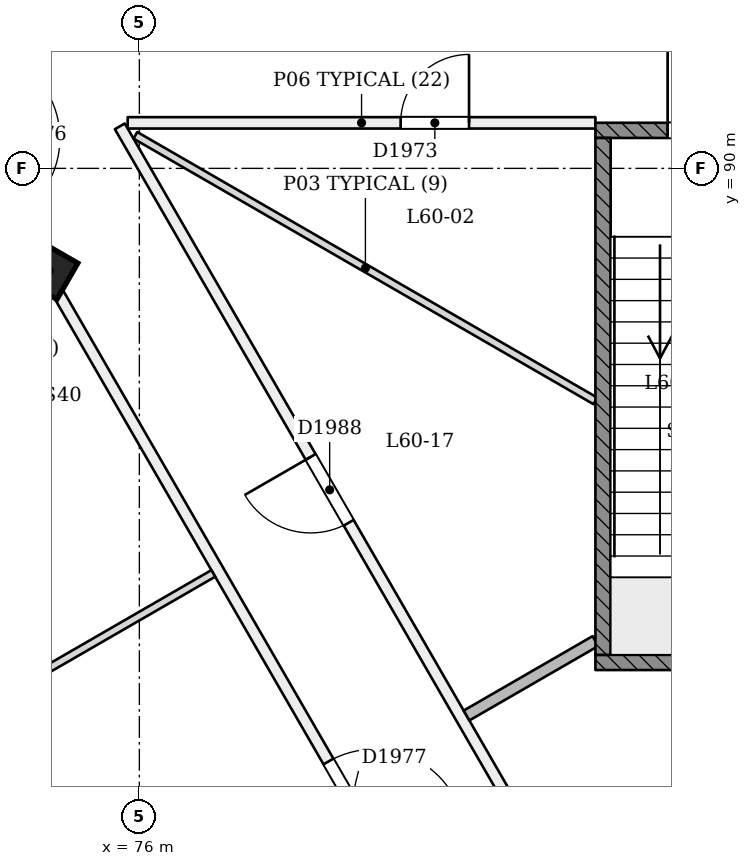
"""IFC4 building model, lengths in metres.
Left out: names, types, materials, properties, quantities, classifications, styles, units other than length and angle.
Written with IfcOpenShell. Run it as: python <this file> out.ifc"""

import sys

from ifc_helpers import new_model, si_unit, direction, frame, frame_2d, origin, origin_2d, place, context, subcontext, project, spatial, rectangle, extrude, element, fill, save


model = new_model("IFC4")
c1 = context("Model", 3, precision=1e-05, world=origin(), true_north=direction((0.0, 1.0)))
c2 = subcontext(c1, "Body", "Model", "MODEL_VIEW")
j1 = project(units=[si_unit("LENGTHUNIT", "METRE"), si_unit("PLANEANGLEUNIT", "RADIAN")], contexts=[c1])
p1 = place(None, origin())
s1 = spatial("IfcSite", under=j1, at=p1, CompositionType="ELEMENT")
p2 = place(p1, origin())
s2 = spatial("IfcBuilding", under=s1, at=p2, CompositionType="ELEMENT")
p3 = place(p2, frame((0.0, 0.0, 233.8)))
s3 = spatial("IfcBuildingStorey", under=s2, at=p3, CompositionType="ELEMENT", Elevation=233.8)
p4 = place(p3, frame((74.787, 88.605, -0.017), z_axis=(0.022221387519, 0.03843577394, 0.999013964476), x_axis=(-0.865894001003, -0.49874768271, 0.038449031443)))
e1 = element("IfcColumn", 1, at=p4, inside=s3, PredefinedType="COLUMN", context=c2, shape_type="SweptSolid", body=[
    extrude(rectangle(XDim=0.55, YDim=0.55, at=origin_2d()), origin(), (0.0, 0.0, 1.0), 5.406),
])
p5 = place(p3, frame((75.846, 90.599, 0.0), z_axis=(0.0, 0.0, 1.0), x_axis=(1.0, 0.0, 0.0)))
e2 = element("IfcWall", 2, at=p5, inside=s3, PredefinedType="PARTITIONING", context=c2, shape_type="SweptSolid", body=[
    extrude(rectangle(XDim=6.154, YDim=0.15, at=frame_2d((3.077, 0.0))), origin(), (0.0, 0.0, 1.0), 5.0),
])
p6 = place(p5, frame((3.591, 0.0, 0.0)))
e3 = element("IfcOpeningElement", 3, at=p6, cuts=e2, PredefinedType="OPENING", context=c2, shape_type="SweptSolid", body=[
    extrude(rectangle(XDim=0.9, YDim=2.1, at=frame_2d((0.45, 1.05))), frame((0.0, 0.085, 0.0), z_axis=(0.0, -1.0, 0.0), x_axis=(1.0, 0.0, 0.0)), (0.0, 0.0, 1.0), 0.171),
])
p7 = place(p3, frame((73.636, 90.6, 0.0), z_axis=(0.0, 0.0, 1.0), x_axis=(0.500000171588, -0.866025304718, 0.0)))
e4 = element("IfcWall", 4, at=p7, inside=s3, PredefinedType="PARTITIONING", context=c2, shape_type="SweptSolid", body=[
    extrude(rectangle(XDim=22.728, YDim=0.15, at=frame_2d((11.364, 0.0))), origin(), (0.0, 0.0, 1.0), 4.6),
])
p8 = place(p7, frame((0.237, 0.0, 0.0)))
e5 = element("IfcOpeningElement", 5, at=p8, cuts=e4, PredefinedType="OPENING", context=c2, shape_type="SweptSolid", body=[
    extrude(rectangle(XDim=1.2, YDim=2.1, at=frame_2d((0.6, 1.05))), frame((0.0, 0.085, 0.0), z_axis=(0.0, -1.0, 0.0), x_axis=(1.0, 0.0, 0.0)), (0.0, 0.0, 1.0), 0.171),
])
p9 = place(p7, frame((9.703, 0.0, 0.0)))
e6 = element("IfcOpeningElement", 6, at=p9, cuts=e4, PredefinedType="OPENING", context=c2, shape_type="SweptSolid", body=[
    extrude(rectangle(XDim=1.2, YDim=2.1, at=frame_2d((0.6, 1.05))), frame((0.0, 0.085, 0.0), z_axis=(0.0, -1.0, 0.0), x_axis=(1.0, 0.0, 0.0)), (0.0, 0.0, 1.0), 0.171),
])
p10 = place(p7, frame((17.453, 0.0, 0.0)))
e7 = element("IfcOpeningElement", 7, at=p10, cuts=e4, PredefinedType="OPENING", context=c2, shape_type="SweptSolid", body=[
    extrude(rectangle(XDim=1.2, YDim=2.1, at=frame_2d((0.6, 1.05))), frame((0.0, 0.085, 0.0), z_axis=(0.0, -1.0, 0.0), x_axis=(1.0, 0.0, 0.0)), (0.0, 0.0, 1.0), 0.171),
])
p11 = place(p7, frame((20.917, 0.0, 0.0)))
e8 = element("IfcOpeningElement", 8, at=p11, cuts=e4, PredefinedType="OPENING", context=c2, shape_type="SweptSolid", body=[
    extrude(rectangle(XDim=1.2, YDim=2.1, at=frame_2d((0.6, 1.05))), frame((0.0, 0.085, 0.0), z_axis=(0.0, -1.0, 0.0), x_axis=(1.0, 0.0, 0.0)), (0.0, 0.0, 1.0), 0.171),
])
p12 = place(p3, frame((84.935, 74.63, 0.0), z_axis=(0.0, 0.0, 1.0), x_axis=(-0.499956559012, 0.866050482998, 0.0)))
e9 = element("IfcWall", 9, at=p12, inside=s3, PredefinedType="PARTITIONING", context=c2, shape_type="SweptSolid", body=[
    extrude(rectangle(XDim=18.386, YDim=0.15, at=frame_2d((9.193, 0.0))), origin(), (0.0, 0.0, 1.0), 5.0),
])
p13 = place(p12, frame((12.364, 0.0, 0.0)))
e10 = element("IfcOpeningElement", 10, at=p13, cuts=e9, PredefinedType="OPENING", context=c2, shape_type="SweptSolid", body=[
    extrude(rectangle(XDim=1.0, YDim=2.1, at=frame_2d((0.5, 1.05))), frame((0.0, 0.085, 0.0), z_axis=(0.0, -1.0, 0.0), x_axis=(1.0, 0.0, 0.0)), (0.0, 0.0, 1.0), 0.171),
])
p14 = place(p12, frame((5.916, 0.0, 0.0)))
e11 = element("IfcOpeningElement", 11, at=p14, cuts=e9, PredefinedType="OPENING", context=c2, shape_type="SweptSolid", body=[
    extrude(rectangle(XDim=1.0, YDim=2.1, at=frame_2d((0.5, 1.05))), frame((0.0, 0.085, 0.0), z_axis=(0.0, -1.0, 0.0), x_axis=(1.0, 0.0, 0.0)), (0.0, 0.0, 1.0), 0.171),
])
p15 = place(p3, frame((75.948, 90.435, 0.0), z_axis=(0.0, 0.0, 1.0), x_axis=(0.866033166555, -0.499986554245, 0.0)))
e12 = element("IfcWall", 12, at=p15, inside=s3, PredefinedType="PARTITIONING", context=c2, shape_type="SweptSolid", body=[
    extrude(rectangle(XDim=6.989, YDim=0.1, at=frame_2d((3.494, 0.0))), origin(), (0.0, 0.0, 1.0), 5.0),
])
p16 = place(p3, frame((71.495, 81.509, 0.0), z_axis=(0.0, 0.0, 1.0), x_axis=(0.866032601554, 0.49998753289, 0.0)))
e13 = element("IfcWall", 13, at=p16, inside=s3, PredefinedType="PARTITIONING", context=c2, shape_type="SweptSolid", body=[
    extrude(rectangle(XDim=6.325, YDim=0.1, at=frame_2d((3.163, 0.0))), origin(), (0.0, 0.0, 1.0), 4.5),
])
p17 = place(p3, frame((80.304, 82.802, 0.0), z_axis=(0.0, 0.0, 1.0), x_axis=(0.866040248701, 0.499974286969, 0.0)))
e14 = element("IfcWall", 14, at=p17, inside=s3, PredefinedType="PARTITIONING", context=c2, shape_type="SweptSolid", body=[
    extrude(rectangle(XDim=1.958, YDim=0.15, at=frame_2d((0.979, 0.0))), origin(), (0.0, 0.0, 1.0), 5.0),
])
p18 = place(p3, frame((82.0, 90.5, 0.0), z_axis=(0.0, 0.0, 1.0), x_axis=(1.0, 0.0, 0.0)))
e15 = element("IfcWall", 15, at=p18, inside=s3, PredefinedType="SOLIDWALL", context=c2, shape_type="SweptSolid", body=[
    extrude(rectangle(XDim=6.0, YDim=0.2, at=frame_2d((3.0, 0.0))), origin(), (0.0, 0.0, 1.0), 5.0),
])
p19 = place(p18, frame((0.95, 0.0, 0.0)))
e16 = element("IfcOpeningElement", 16, at=p19, cuts=e15, PredefinedType="OPENING", context=c2, shape_type="SweptSolid", body=[
    extrude(rectangle(XDim=1.2, YDim=2.1, at=frame_2d((0.6, 1.05))), frame((0.0, 0.11, 0.0), z_axis=(0.0, -1.0, 0.0), x_axis=(1.0, 0.0, 0.0)), (0.0, 0.0, 1.0), 0.221),
])
p20 = place(p18, frame((3.85, 0.0, 0.0)))
e17 = element("IfcOpeningElement", 17, at=p20, cuts=e15, PredefinedType="OPENING", context=c2, shape_type="SweptSolid", body=[
    extrude(rectangle(XDim=1.2, YDim=2.1, at=frame_2d((0.6, 1.05))), frame((0.0, 0.11, 0.0), z_axis=(0.0, -1.0, 0.0), x_axis=(1.0, 0.0, 0.0)), (0.0, 0.0, 1.0), 0.221),
])
p21 = place(p3, frame((82.0, 83.5, 0.0), z_axis=(0.0, 0.0, 1.0), x_axis=(1.0, 0.0, 0.0)))
e18 = element("IfcWall", 18, at=p21, inside=s3, PredefinedType="SOLIDWALL", context=c2, shape_type="SweptSolid", body=[
    extrude(rectangle(XDim=6.0, YDim=0.2, at=frame_2d((3.0, 0.0))), origin(), (0.0, 0.0, 1.0), 5.0),
])
p22 = place(p3, frame((82.1, 83.6, 0.0), z_axis=(0.0, 0.0, 1.0), x_axis=(0.0, 1.0, 0.0)))
e19 = element("IfcWall", 19, at=p22, inside=s3, PredefinedType="SOLIDWALL", context=c2, shape_type="SweptSolid", body=[
    extrude(rectangle(XDim=6.8, YDim=0.2, at=frame_2d((3.4, 0.0))), origin(), (0.0, 0.0, 1.0), 5.0),
])
p23 = place(p6, origin())
e20 = element("IfcDoor", 20, at=p23, inside=s3, OperationType="SINGLE_SWING_RIGHT", PredefinedType="NOTDEFINED", context=c2, shape_type="SweptSolid", body=[
    extrude(rectangle(XDim=0.9, YDim=2.1, at=frame_2d((0.45, 1.05))), frame((0.0, 0.025, 0.0), z_axis=(0.0, -1.0, 0.0), x_axis=(1.0, 0.0, 0.0)), (0.0, 0.0, 1.0), 0.05),
])
fill(e3, e20)
p24 = place(p9, origin())
e21 = element("IfcDoor", 21, at=p24, inside=s3, OperationType="SINGLE_SWING_RIGHT", PredefinedType="NOTDEFINED", context=c2, shape_type="SweptSolid", body=[
    extrude(rectangle(XDim=1.2, YDim=2.1, at=frame_2d((0.6, 1.05))), frame((0.0, 0.025, 0.0), z_axis=(0.0, -1.0, 0.0), x_axis=(1.0, 0.0, 0.0)), (0.0, 0.0, 1.0), 0.05),
])
fill(e6, e21)
p25 = place(p13, origin())
e22 = element("IfcDoor", 22, at=p25, inside=s3, OperationType="SINGLE_SWING_RIGHT", PredefinedType="NOTDEFINED", context=c2, shape_type="SweptSolid", body=[
    extrude(rectangle(XDim=1.0, YDim=2.1, at=frame_2d((0.5, 1.05))), frame((0.0, 0.025, 0.0), z_axis=(0.0, -1.0, 0.0), x_axis=(1.0, 0.0, 0.0)), (0.0, 0.0, 1.0), 0.05),
])
fill(e10, e22)
p26 = place(p19, origin())
e23 = element("IfcDoor", 23, at=p26, inside=s3, OperationType="SINGLE_SWING_LEFT", PredefinedType="NOTDEFINED", context=c2, shape_type="SweptSolid", body=[
    extrude(rectangle(XDim=1.2, YDim=2.1, at=frame_2d((0.6, 1.05))), frame((0.0, 0.025, 0.0), z_axis=(0.0, -1.0, 0.0), x_axis=(1.0, 0.0, 0.0)), (0.0, 0.0, 1.0), 0.05),
])
fill(e16, e23)
save(model, sys.argv[1])
